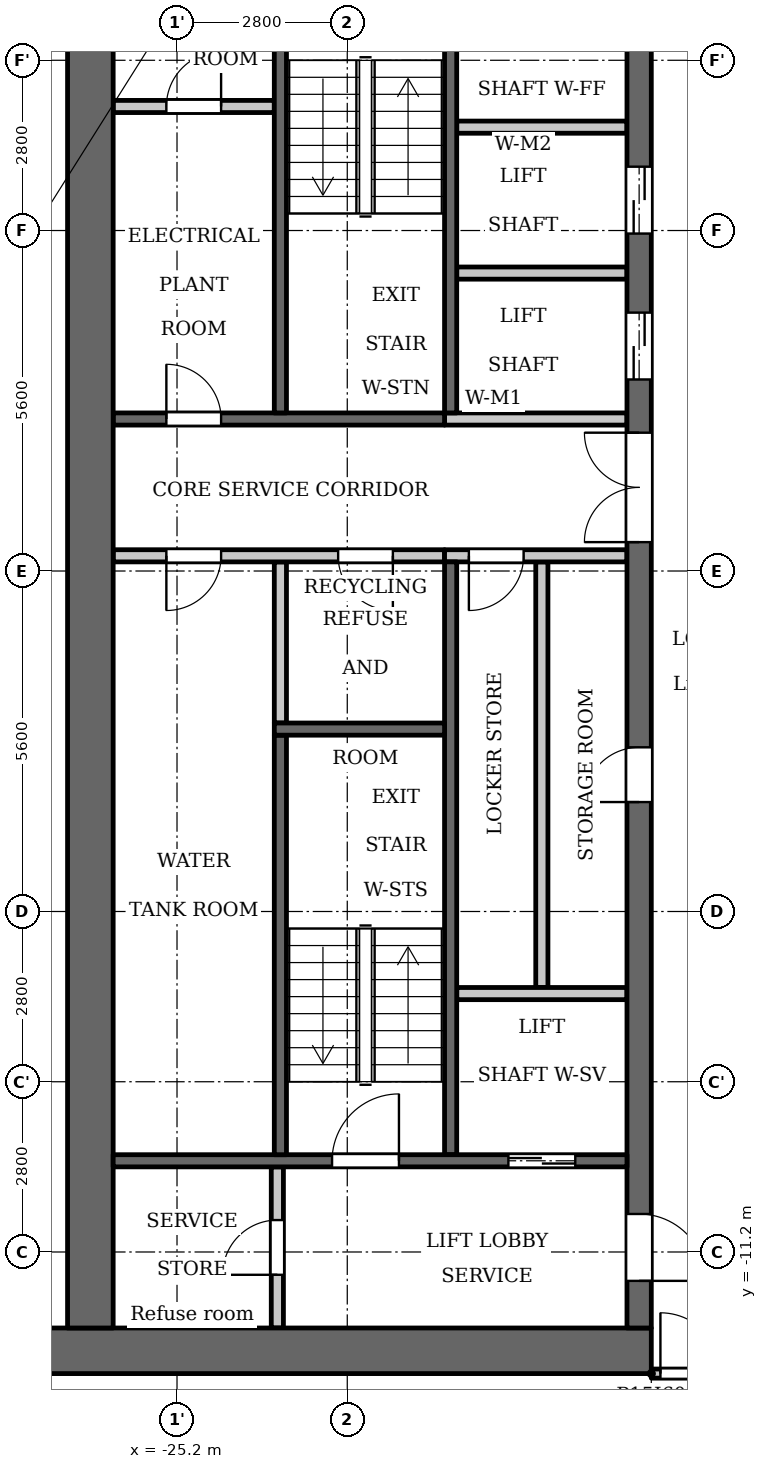
"""IFC4 building model, lengths in metres.
Left out: names, types, materials, properties, quantities, classifications, styles, units other than length and angle.
Written with IfcOpenShell. Run it as: python <this file> out.ifc"""

import sys

from ifc_helpers import new_model, si_unit, direction, frame, frame_2d, origin, place, context, subcontext, project, spatial, rectangle, extrude, element, fill, save


model = new_model("IFC4")
c1 = context("Model", 3, precision=1e-05, world=origin(), true_north=direction((0.0, 1.0)))
c2 = subcontext(c1, "Body", "Model", "MODEL_VIEW")
j1 = project(units=[si_unit("LENGTHUNIT", "METRE"), si_unit("PLANEANGLEUNIT", "RADIAN")], contexts=[c1])
p1 = place(None, origin())
s1 = spatial("IfcSite", under=j1, at=p1, CompositionType="ELEMENT")
p2 = place(p1, origin())
s2 = spatial("IfcBuilding", under=s1, at=p2, CompositionType="ELEMENT")
p3 = place(p2, frame((0.0, 0.0, 139.6)))
s3 = spatial("IfcBuildingStorey", under=s2, at=p3, CompositionType="ELEMENT", Elevation=139.6)
p4 = place(p3, frame((-23.5, -2.5, 0.0), z_axis=(0.0, 0.0, 1.0), x_axis=(0.0, 1.0, 0.0)))
e1 = element("IfcWall", 1, at=p4, inside=s3, PredefinedType="PARTITIONING", context=c2, shape_type="SweptSolid", body=[
    extrude(rectangle(XDim=2.65, YDim=0.2, at=frame_2d((1.325, 0.0))), origin(), (0.0, 0.0, 1.0), 3.2),
])
p5 = place(p3, frame((-20.7, 2.6, 0.0), z_axis=(0.0, 0.0, 1.0), x_axis=(0.0, 1.0, 0.0)))
e2 = element("IfcWall", 2, at=p5, inside=s3, PredefinedType="SHEAR", context=c2, shape_type="SweptSolid", body=[
    extrude(rectangle(XDim=7.0, YDim=0.2, at=frame_2d((3.5, 0.0))), origin(), (0.0, 0.0, 1.0), 3.2),
])
p6 = place(p3, frame((-20.7, -9.6, 0.0), z_axis=(0.0, 0.0, 1.0), x_axis=(0.0, 1.0, 0.0)))
e3 = element("IfcWall", 3, at=p6, inside=s3, PredefinedType="SHEAR", context=c2, shape_type="SweptSolid", body=[
    extrude(rectangle(XDim=9.75, YDim=0.2, at=frame_2d((4.875, 0.0))), origin(), (0.0, 0.0, 1.0), 3.2),
])
p7 = place(p3, frame((-20.8, 2.5, 0.0), z_axis=(0.0, 0.0, 1.0), x_axis=(-1.0, 0.0, 0.0)))
e4 = element("IfcWall", 4, at=p7, inside=s3, PredefinedType="SHEAR", context=c2, shape_type="SweptSolid", body=[
    extrude(rectangle(XDim=5.45, YDim=0.2, at=frame_2d((2.725, 0.0))), origin(), (0.0, 0.0, 1.0), 3.2),
])
p8 = place(p7, frame((3.675, 0.0, 0.0)))
e5 = element("IfcOpeningElement", 5, at=p8, cuts=e4, PredefinedType="OPENING", context=c2, shape_type="SweptSolid", body=[
    extrude(rectangle(XDim=0.9, YDim=2.1, at=frame_2d((0.45, 1.05))), frame((0.0, 0.11, 0.0), z_axis=(0.0, -1.0, 0.0), x_axis=(1.0, 0.0, 0.0)), (0.0, 0.0, 1.0), 0.22),
])
p9 = place(p3, frame((-20.8, 0.25, 0.0), z_axis=(0.0, 0.0, 1.0), x_axis=(-1.0, 0.0, 0.0)))
e6 = element("IfcWall", 6, at=p9, inside=s3, PredefinedType="PARTITIONING", context=c2, shape_type="SweptSolid", body=[
    extrude(rectangle(XDim=5.45, YDim=0.2, at=frame_2d((2.725, 0.0))), origin(), (0.0, 0.0, 1.0), 3.2),
])
p10 = place(p9, frame((0.85, 0.0, 0.0)))
e7 = element("IfcOpeningElement", 7, at=p10, cuts=e6, PredefinedType="OPENING", context=c2, shape_type="SweptSolid", body=[
    extrude(rectangle(XDim=0.9, YDim=2.1, at=frame_2d((0.45, 1.05))), frame((0.0, 0.11, 0.0), z_axis=(0.0, -1.0, 0.0), x_axis=(1.0, 0.0, 0.0)), (0.0, 0.0, 1.0), 0.22),
])
p11 = place(p9, frame((3.675, 0.0, 0.0)))
e8 = element("IfcOpeningElement", 8, at=p11, cuts=e6, PredefinedType="OPENING", context=c2, shape_type="SweptSolid", body=[
    extrude(rectangle(XDim=0.9, YDim=2.1, at=frame_2d((0.45, 1.05))), frame((0.0, 0.11, 0.0), z_axis=(0.0, -1.0, 0.0), x_axis=(1.0, 0.0, 0.0)), (0.0, 0.0, 1.0), 0.22),
])
p12 = place(p3, frame((-17.4, -12.825, 0.0), z_axis=(0.0, 0.0, 1.0), x_axis=(-1.0, 0.0, 0.0)))
e9 = element("IfcWall", 9, at=p12, inside=s3, PredefinedType="SHEAR", context=c2, shape_type="SweptSolid", body=[
    extrude(rectangle(XDim=10.4, YDim=0.75, at=frame_2d((5.2, 0.0))), origin(), (0.0, 0.0, 1.0), 3.2),
])
p13 = place(p3, frame((-19.2, -6.85, 0.0), z_axis=(0.0, 0.0, 1.0), x_axis=(0.0, 1.0, 0.0)))
e10 = element("IfcWall", 10, at=p13, inside=s3, PredefinedType="PARTITIONING", context=c2, shape_type="SweptSolid", body=[
    extrude(rectangle(XDim=7.0, YDim=0.2, at=frame_2d((3.5, 0.0))), origin(), (0.0, 0.0, 1.0), 3.2),
])
p14 = place(p3, frame((-17.6, -12.45, 0.0), z_axis=(0.0, 0.0, 1.0), x_axis=(0.0, 1.0, 0.0)))
e11 = element("IfcWall", 11, at=p14, inside=s3, PredefinedType="SHEAR", context=c2, shape_type="SweptSolid", body=[
    extrude(rectangle(XDim=24.9, YDim=0.4, at=frame_2d((12.45, 0.0))), origin(), (0.0, 0.0, 1.0), 3.2),
])
p15 = place(p14, frame((8.65, 0.0, 0.0)))
e12 = element("IfcOpeningElement", 12, at=p15, cuts=e11, PredefinedType="OPENING", context=c2, shape_type="SweptSolid", body=[
    extrude(rectangle(XDim=0.9, YDim=2.1, at=frame_2d((0.45, 1.05))), frame((0.0, 0.21, 0.0), z_axis=(0.0, -1.0, 0.0), x_axis=(1.0, 0.0, 0.0)), (0.0, 0.0, 1.0), 0.42),
])
p16 = place(p14, frame((15.6, 0.0, 0.0)))
e13 = element("IfcOpeningElement", 13, at=p16, cuts=e11, PredefinedType="OPENING", context=c2, shape_type="SweptSolid", body=[
    extrude(rectangle(XDim=1.1, YDim=2.1, at=frame_2d((0.55, 1.05))), frame((0.0, 0.21, 0.0), z_axis=(0.0, -1.0, 0.0), x_axis=(1.0, 0.0, 0.0)), (0.0, 0.0, 1.0), 0.42),
])
p17 = place(p14, frame((18.0, 0.0, 0.0)))
e14 = element("IfcOpeningElement", 14, at=p17, cuts=e11, PredefinedType="OPENING", context=c2, shape_type="SweptSolid", body=[
    extrude(rectangle(XDim=1.1, YDim=2.1, at=frame_2d((0.55, 1.05))), frame((0.0, 0.21, 0.0), z_axis=(0.0, -1.0, 0.0), x_axis=(1.0, 0.0, 0.0)), (0.0, 0.0, 1.0), 0.42),
])
p18 = place(p14, frame((23.025, 0.0, 0.0)))
e15 = element("IfcOpeningElement", 15, at=p18, cuts=e11, PredefinedType="OPENING", context=c2, shape_type="SweptSolid", body=[
    extrude(rectangle(XDim=1.1, YDim=2.1, at=frame_2d((0.55, 1.05))), frame((0.0, 0.21, 0.0), z_axis=(0.0, -1.0, 0.0), x_axis=(1.0, 0.0, 0.0)), (0.0, 0.0, 1.0), 0.42),
])
p19 = place(p14, frame((0.775, 0.0, 0.0)))
e16 = element("IfcOpeningElement", 16, at=p19, cuts=e11, PredefinedType="OPENING", context=c2, shape_type="SweptSolid", body=[
    extrude(rectangle(XDim=1.1, YDim=2.1, at=frame_2d((0.55, 1.05))), frame((0.0, 0.21, 0.0), z_axis=(0.0, -1.0, 0.0), x_axis=(1.0, 0.0, 0.0)), (0.0, 0.0, 1.0), 0.42),
])
p20 = place(p14, frame((12.925, 0.0, 0.0)))
e17 = element("IfcOpeningElement", 17, at=p20, cuts=e11, PredefinedType="OPENING", context=c2, shape_type="SweptSolid", body=[
    extrude(rectangle(XDim=1.8, YDim=2.1, at=frame_2d((0.9, 1.05))), frame((0.0, 0.21, 0.0), z_axis=(0.0, -1.0, 0.0), x_axis=(1.0, 0.0, 0.0)), (0.0, 0.0, 1.0), 0.42),
])
p21 = place(p3, frame((-26.625, -12.45, 0.0), z_axis=(0.0, 0.0, 1.0), x_axis=(0.0, 1.0, 0.0)))
e18 = element("IfcWall", 18, at=p21, inside=s3, PredefinedType="SHEAR", context=c2, shape_type="SweptSolid", body=[
    extrude(rectangle(XDim=24.9, YDim=0.75, at=frame_2d((12.45, 0.0))), origin(), (0.0, 0.0, 1.0), 3.2),
])
p22 = place(p3, frame((-23.55, -12.45, 0.0), z_axis=(0.0, 0.0, 1.0), x_axis=(0.0, 1.0, 0.0)))
e19 = element("IfcWall", 19, at=p22, inside=s3, PredefinedType="PARTITIONING", context=c2, shape_type="SweptSolid", body=[
    extrude(rectangle(XDim=2.65, YDim=0.2, at=frame_2d((1.325, 0.0))), origin(), (0.0, 0.0, 1.0), 3.2),
])
p23 = place(p22, frame((0.875, 0.0, 0.0)))
e20 = element("IfcOpeningElement", 20, at=p23, cuts=e19, PredefinedType="OPENING", context=c2, shape_type="SweptSolid", body=[
    extrude(rectangle(XDim=0.9, YDim=2.1, at=frame_2d((0.45, 1.05))), frame((0.0, 0.11, 0.0), z_axis=(0.0, -1.0, 0.0), x_axis=(1.0, 0.0, 0.0)), (0.0, 0.0, 1.0), 0.22),
])
p24 = place(p3, frame((-23.6, 7.64, 0.0), z_axis=(0.0, 0.0, 1.0), x_axis=(-1.0, 0.0, 0.0)))
e21 = element("IfcWall", 21, at=p24, inside=s3, PredefinedType="PARTITIONING", context=c2, shape_type="SweptSolid", body=[
    extrude(rectangle(XDim=2.65, YDim=0.2, at=frame_2d((1.325, 0.0))), origin(), (0.0, 0.0, 1.0), 3.2),
])
p25 = place(p24, frame((0.875, 0.0, 0.0)))
e22 = element("IfcOpeningElement", 22, at=p25, cuts=e21, PredefinedType="OPENING", context=c2, shape_type="SweptSolid", body=[
    extrude(rectangle(XDim=0.9, YDim=2.1, at=frame_2d((0.45, 1.05))), frame((0.0, 0.11, 0.0), z_axis=(0.0, -1.0, 0.0), x_axis=(1.0, 0.0, 0.0)), (0.0, 0.0, 1.0), 0.22),
])
p26 = place(p3, frame((-17.8, -9.7, 0.0), z_axis=(0.0, 0.0, 1.0), x_axis=(-1.0, 0.0, 0.0)))
e23 = element("IfcWall", 23, at=p26, inside=s3, PredefinedType="SHEAR", context=c2, shape_type="SweptSolid", body=[
    extrude(rectangle(XDim=8.45, YDim=0.2, at=frame_2d((4.225, 0.0))), origin(), (0.0, 0.0, 1.0), 3.2),
])
p27 = place(p26, frame((0.85, 0.0, 0.0)))
e24 = element("IfcOpeningElement", 24, at=p27, cuts=e23, PredefinedType="OPENING", context=c2, shape_type="SweptSolid", body=[
    extrude(rectangle(XDim=1.1, YDim=2.1, at=frame_2d((0.55, 1.05))), frame((0.0, 0.11, 0.0), z_axis=(0.0, -1.0, 0.0), x_axis=(1.0, 0.0, 0.0)), (0.0, 0.0, 1.0), 0.22),
])
p28 = place(p26, frame((3.75, 0.0, 0.0)))
e25 = element("IfcOpeningElement", 25, at=p28, cuts=e23, PredefinedType="OPENING", context=c2, shape_type="SweptSolid", body=[
    extrude(rectangle(XDim=1.1, YDim=2.1, at=frame_2d((0.55, 1.05))), frame((0.0, 0.11, 0.0), z_axis=(0.0, -1.0, 0.0), x_axis=(1.0, 0.0, 0.0)), (0.0, 0.0, 1.0), 0.22),
])
p29 = place(p3, frame((-17.8, -6.95, 0.0), z_axis=(0.0, 0.0, 1.0), x_axis=(-1.0, 0.0, 0.0)))
e26 = element("IfcWall", 26, at=p29, inside=s3, PredefinedType="PARTITIONING", context=c2, shape_type="SweptSolid", body=[
    extrude(rectangle(XDim=2.8, YDim=0.2, at=frame_2d((1.4, 0.0))), origin(), (0.0, 0.0, 1.0), 3.2),
])
p30 = place(p3, frame((-17.8, 0.25, 0.0), z_axis=(0.0, 0.0, 1.0), x_axis=(-1.0, 0.0, 0.0)))
e27 = element("IfcWall", 27, at=p30, inside=s3, PredefinedType="PARTITIONING", context=c2, shape_type="SweptSolid", body=[
    extrude(rectangle(XDim=3.0, YDim=0.2, at=frame_2d((1.5, 0.0))), origin(), (0.0, 0.0, 1.0), 3.2),
])
p31 = place(p30, frame((1.7, 0.0, 0.0)))
e28 = element("IfcOpeningElement", 28, at=p31, cuts=e27, PredefinedType="OPENING", context=c2, shape_type="SweptSolid", body=[
    extrude(rectangle(XDim=0.9, YDim=2.1, at=frame_2d((0.45, 1.05))), frame((0.0, 0.11, 0.0), z_axis=(0.0, -1.0, 0.0), x_axis=(1.0, 0.0, 0.0)), (0.0, 0.0, 1.0), 0.22),
])
p32 = place(p3, frame((-17.8, 2.5, 0.0), z_axis=(0.0, 0.0, 1.0), x_axis=(-1.0, 0.0, 0.0)))
e29 = element("IfcWall", 29, at=p32, inside=s3, PredefinedType="PARTITIONING", context=c2, shape_type="SweptSolid", body=[
    extrude(rectangle(XDim=3.0, YDim=0.2, at=frame_2d((1.5, 0.0))), origin(), (0.0, 0.0, 1.0), 3.2),
])
for number, where, z_axis, x_axis in (
    (30, (-17.8, 4.9, 0.0), (0.0, 0.0, 1.0), (-1.0, 0.0, 0.0)),
    (31, (-17.8, 7.3, 0.0), (0.0, 0.0, 1.0), (-1.0, 0.0, 0.0)),
):
    element("IfcWall", number, at=place(p3, frame(where, z_axis=z_axis, x_axis=x_axis)), inside=s3, PredefinedType="PARTITIONING", context=c2, shape_type="SweptSolid", body=[
        extrude(rectangle(XDim=2.8, YDim=0.2, at=frame_2d((1.4, 0.0))), origin(), (0.0, 0.0, 1.0), 3.2),
    ])
p33 = place(p3, frame((-23.5, 2.6, 0.0), z_axis=(0.0, 0.0, 1.0), x_axis=(0.0, 1.0, 0.0)))
e32 = element("IfcWall", 32, at=p33, inside=s3, PredefinedType="SHEAR", context=c2, shape_type="SweptSolid", body=[
    extrude(rectangle(XDim=7.0, YDim=0.2, at=frame_2d((3.5, 0.0))), origin(), (0.0, 0.0, 1.0), 3.2),
])
p34 = place(p3, frame((-23.5, -9.6, 0.0), z_axis=(0.0, 0.0, 1.0), x_axis=(0.0, 1.0, 0.0)))
e33 = element("IfcWall", 33, at=p34, inside=s3, PredefinedType="SHEAR", context=c2, shape_type="SweptSolid", body=[
    extrude(rectangle(XDim=6.9, YDim=0.2, at=frame_2d((3.45, 0.0))), origin(), (0.0, 0.0, 1.0), 3.2),
])
p35 = place(p3, frame((-20.8, -2.6, 0.0), z_axis=(0.0, 0.0, 1.0), x_axis=(-1.0, 0.0, 0.0)))
e34 = element("IfcWall", 34, at=p35, inside=s3, PredefinedType="SHEAR", context=c2, shape_type="SweptSolid", body=[
    extrude(rectangle(XDim=2.8, YDim=0.2, at=frame_2d((1.4, 0.0))), origin(), (0.0, 0.0, 1.0), 3.2),
])
p36 = place(p3, frame((-17.4, -13.2, 0.0), z_axis=(0.0, 0.0, 1.0), x_axis=(1.0, 0.0, 0.0)))
e35 = element("IfcWall", 35, at=p36, inside=s3, PredefinedType="PARTITIONING", context=c2, shape_type="SweptSolid", body=[
    extrude(rectangle(XDim=34.8, YDim=0.15, at=frame_2d((17.4, 0.0))), origin(), (0.0, 0.0, 1.0), 3.2),
])
p37 = place(p36, frame((0.15, 0.0, 0.0)))
e36 = element("IfcOpeningElement", 36, at=p37, cuts=e35, PredefinedType="OPENING", context=c2, shape_type="SweptSolid", body=[
    extrude(rectangle(XDim=1.0, YDim=2.1, at=frame_2d((0.5, 1.05))), frame((0.0, 0.085, 0.0), z_axis=(0.0, -1.0, 0.0), x_axis=(1.0, 0.0, 0.0)), (0.0, 0.0, 1.0), 0.17),
])
p38 = place(p36, frame((33.55, 0.0, 0.0)))
e37 = element("IfcOpeningElement", 37, at=p38, cuts=e35, PredefinedType="OPENING", context=c2, shape_type="SweptSolid", body=[
    extrude(rectangle(XDim=1.0, YDim=2.1, at=frame_2d((0.5, 1.05))), frame((0.0, 0.085, 0.0), z_axis=(0.0, -1.0, 0.0), x_axis=(1.0, 0.0, 0.0)), (0.0, 0.0, 1.0), 0.17),
])
p39 = place(p36, frame((6.85, 0.0, 0.0)))
e38 = element("IfcOpeningElement", 38, at=p39, cuts=e35, PredefinedType="OPENING", context=c2, shape_type="SweptSolid", body=[
    extrude(rectangle(XDim=1.0, YDim=2.1, at=frame_2d((0.5, 1.05))), frame((0.0, 0.085, 0.0), z_axis=(0.0, -1.0, 0.0), x_axis=(1.0, 0.0, 0.0)), (0.0, 0.0, 1.0), 0.17),
])
p40 = place(p36, frame((12.45, 0.0, 0.0)))
e39 = element("IfcOpeningElement", 39, at=p40, cuts=e35, PredefinedType="OPENING", context=c2, shape_type="SweptSolid", body=[
    extrude(rectangle(XDim=1.0, YDim=2.1, at=frame_2d((0.5, 1.05))), frame((0.0, 0.085, 0.0), z_axis=(0.0, -1.0, 0.0), x_axis=(1.0, 0.0, 0.0)), (0.0, 0.0, 1.0), 0.17),
])
p41 = place(p36, frame((21.3, 0.0, 0.0)))
e40 = element("IfcOpeningElement", 40, at=p41, cuts=e35, PredefinedType="OPENING", context=c2, shape_type="SweptSolid", body=[
    extrude(rectangle(XDim=1.0, YDim=2.1, at=frame_2d((0.5, 1.05))), frame((0.0, 0.085, 0.0), z_axis=(0.0, -1.0, 0.0), x_axis=(1.0, 0.0, 0.0)), (0.0, 0.0, 1.0), 0.17),
])
p42 = place(p36, frame((26.9, 0.0, 0.0)))
e41 = element("IfcOpeningElement", 41, at=p42, cuts=e35, PredefinedType="OPENING", context=c2, shape_type="SweptSolid", body=[
    extrude(rectangle(XDim=1.0, YDim=2.1, at=frame_2d((0.5, 1.05))), frame((0.0, 0.085, 0.0), z_axis=(0.0, -1.0, 0.0), x_axis=(1.0, 0.0, 0.0)), (0.0, 0.0, 1.0), 0.17),
])
p43 = place(p27, origin())
e42 = element("IfcDoor", 42, at=p43, inside=s3, OperationType="DOUBLE_DOOR_SLIDING", PredefinedType="DOOR", context=c2, shape_type="SweptSolid", body=[
    extrude(rectangle(XDim=1.1, YDim=2.1, at=frame_2d((0.55, 1.05))), frame((0.0, 0.025, 0.0), z_axis=(0.0, -1.0, 0.0), x_axis=(1.0, 0.0, 0.0)), (0.0, 0.0, 1.0), 0.05),
])
fill(e24, e42)
p44 = place(p15, origin())
e43 = element("IfcDoor", 43, at=p44, inside=s3, OperationType="SINGLE_SWING_RIGHT", PredefinedType="DOOR", context=c2, shape_type="SweptSolid", body=[
    extrude(rectangle(XDim=0.9, YDim=2.1, at=frame_2d((0.45, 1.05))), frame((0.0, 0.025, 0.0), z_axis=(0.0, -1.0, 0.0), x_axis=(1.0, 0.0, 0.0)), (0.0, 0.0, 1.0), 0.05),
])
fill(e12, e43)
p45 = place(p31, origin())
e44 = element("IfcDoor", 44, at=p45, inside=s3, OperationType="SINGLE_SWING_LEFT", PredefinedType="DOOR", context=c2, shape_type="SweptSolid", body=[
    extrude(rectangle(XDim=0.9, YDim=2.1, at=frame_2d((0.45, 1.05))), frame((0.0, 0.025, 0.0), z_axis=(0.0, -1.0, 0.0), x_axis=(1.0, 0.0, 0.0)), (0.0, 0.0, 1.0), 0.05),
])
fill(e28, e44)
p46 = place(p16, origin())
e45 = element("IfcDoor", 45, at=p46, inside=s3, OperationType="DOUBLE_DOOR_SLIDING", PredefinedType="DOOR", context=c2, shape_type="SweptSolid", body=[
    extrude(rectangle(XDim=1.1, YDim=2.1, at=frame_2d((0.55, 1.05))), frame((0.0, 0.025, 0.0), z_axis=(0.0, -1.0, 0.0), x_axis=(1.0, 0.0, 0.0)), (0.0, 0.0, 1.0), 0.05),
])
fill(e13, e45)
p47 = place(p17, origin())
e46 = element("IfcDoor", 46, at=p47, inside=s3, OperationType="DOUBLE_DOOR_SLIDING", PredefinedType="DOOR", context=c2, shape_type="SweptSolid", body=[
    extrude(rectangle(XDim=1.1, YDim=2.1, at=frame_2d((0.55, 1.05))), frame((0.0, 0.025, 0.0), z_axis=(0.0, -1.0, 0.0), x_axis=(1.0, 0.0, 0.0)), (0.0, 0.0, 1.0), 0.05),
])
fill(e14, e46)
p48 = place(p19, origin())
e47 = element("IfcDoor", 47, at=p48, inside=s3, OperationType="SINGLE_SWING_LEFT", PredefinedType="DOOR", context=c2, shape_type="SweptSolid", body=[
    extrude(rectangle(XDim=1.1, YDim=2.1, at=frame_2d((0.55, 1.05))), frame((0.0, 0.025, 0.0), z_axis=(0.0, -1.0, 0.0), x_axis=(1.0, 0.0, 0.0)), (0.0, 0.0, 1.0), 0.05),
])
fill(e16, e47)
p49 = place(p23, origin())
e48 = element("IfcDoor", 48, at=p49, inside=s3, OperationType="SINGLE_SWING_RIGHT", PredefinedType="DOOR", context=c2, shape_type="SweptSolid", body=[
    extrude(rectangle(XDim=0.9, YDim=2.1, at=frame_2d((0.45, 1.05))), frame((0.0, 0.025, 0.0), z_axis=(0.0, -1.0, 0.0), x_axis=(1.0, 0.0, 0.0)), (0.0, 0.0, 1.0), 0.05),
])
fill(e20, e48)
p50 = place(p28, origin())
e49 = element("IfcDoor", 49, at=p50, inside=s3, OperationType="SINGLE_SWING_LEFT", PredefinedType="DOOR", context=c2, shape_type="SweptSolid", body=[
    extrude(rectangle(XDim=1.1, YDim=2.1, at=frame_2d((0.55, 1.05))), frame((0.0, 0.025, 0.0), z_axis=(0.0, -1.0, 0.0), x_axis=(1.0, 0.0, 0.0)), (0.0, 0.0, 1.0), 0.05),
])
fill(e25, e49)
p51 = place(p20, origin())
e50 = element("IfcDoor", 50, at=p51, inside=s3, OperationType="DOUBLE_DOOR_SINGLE_SWING", PredefinedType="DOOR", context=c2, shape_type="SweptSolid", body=[
    extrude(rectangle(XDim=1.8, YDim=2.1, at=frame_2d((0.9, 1.05))), frame((0.0, 0.025, 0.0), z_axis=(0.0, -1.0, 0.0), x_axis=(1.0, 0.0, 0.0)), (0.0, 0.0, 1.0), 0.05),
])
fill(e17, e50)
p52 = place(p10, origin())
e51 = element("IfcDoor", 51, at=p52, inside=s3, OperationType="SINGLE_SWING_RIGHT", PredefinedType="DOOR", context=c2, shape_type="SweptSolid", body=[
    extrude(rectangle(XDim=0.9, YDim=2.1, at=frame_2d((0.45, 1.05))), frame((0.0, 0.025, 0.0), z_axis=(0.0, -1.0, 0.0), x_axis=(1.0, 0.0, 0.0)), (0.0, 0.0, 1.0), 0.05),
])
fill(e7, e51)
p53 = place(p11, origin())
e52 = element("IfcDoor", 52, at=p53, inside=s3, OperationType="SINGLE_SWING_LEFT", PredefinedType="DOOR", context=c2, shape_type="SweptSolid", body=[
    extrude(rectangle(XDim=0.9, YDim=2.1, at=frame_2d((0.45, 1.05))), frame((0.0, 0.025, 0.0), z_axis=(0.0, -1.0, 0.0), x_axis=(1.0, 0.0, 0.0)), (0.0, 0.0, 1.0), 0.05),
])
fill(e8, e52)
p54 = place(p25, origin())
e53 = element("IfcDoor", 53, at=p54, inside=s3, OperationType="SINGLE_SWING_LEFT", PredefinedType="DOOR", context=c2, shape_type="SweptSolid", body=[
    extrude(rectangle(XDim=0.9, YDim=2.1, at=frame_2d((0.45, 1.05))), frame((0.0, 0.025, 0.0), z_axis=(0.0, -1.0, 0.0), x_axis=(1.0, 0.0, 0.0)), (0.0, 0.0, 1.0), 0.05),
])
fill(e22, e53)
p55 = place(p8, origin())
e54 = element("IfcDoor", 54, at=p55, inside=s3, OperationType="SINGLE_SWING_RIGHT", PredefinedType="DOOR", context=c2, shape_type="SweptSolid", body=[
    extrude(rectangle(XDim=0.9, YDim=2.1, at=frame_2d((0.45, 1.05))), frame((0.0, 0.025, 0.0), z_axis=(0.0, -1.0, 0.0), x_axis=(1.0, 0.0, 0.0)), (0.0, 0.0, 1.0), 0.05),
])
fill(e5, e54)
p56 = place(p37, origin())
e55 = element("IfcDoor", 55, at=p56, inside=s3, OperationType="SINGLE_SWING_RIGHT", PredefinedType="DOOR", context=c2, shape_type="SweptSolid", body=[
    extrude(rectangle(XDim=1.0, YDim=2.1, at=frame_2d((0.5, 1.05))), frame((0.0, 0.025, 0.0), z_axis=(0.0, -1.0, 0.0), x_axis=(1.0, 0.0, 0.0)), (0.0, 0.0, 1.0), 0.05),
])
fill(e36, e55)
save(model, sys.argv[1])
